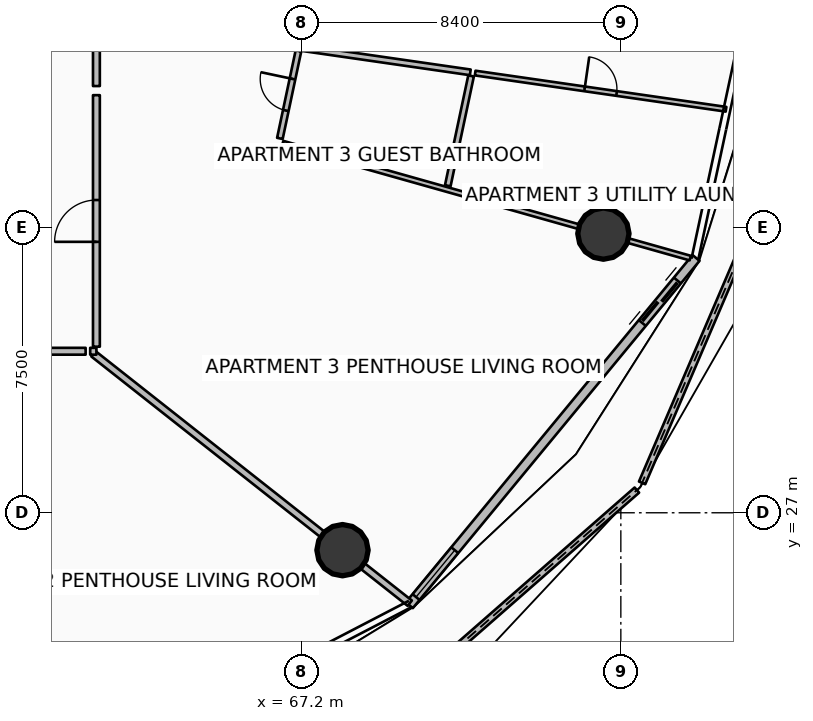
"""IFC4 building model, lengths in metres.
Left out: names, types, materials, properties, quantities, classifications, styles, units other than length and angle.
Written with IfcOpenShell. Run it as: python <this file> out.ifc"""

import sys

from ifc_helpers import new_model, si_unit, direction, frame, frame_2d, origin, origin_2d, place, context, subcontext, project, spatial, polyline, rectangle, circle, outline, extrude, element, fill, save


model = new_model("IFC4")
c1 = context("Model", 3, precision=1e-05, world=origin(), true_north=direction((0.0, 1.0)))
c2 = subcontext(c1, "Body", "Model", "MODEL_VIEW")
j1 = project(units=[si_unit("LENGTHUNIT", "METRE"), si_unit("PLANEANGLEUNIT", "RADIAN")], contexts=[c1])
p1 = place(None, origin())
s1 = spatial("IfcSite", under=j1, at=p1, CompositionType="ELEMENT")
p2 = place(p1, origin())
s2 = spatial("IfcBuilding", under=s1, at=p2, CompositionType="ELEMENT")
p3 = place(p2, frame((0.0, 0.0, 41.4)))
s3 = spatial("IfcBuildingStorey", under=s2, at=p3, CompositionType="ELEMENT", Elevation=41.4)
for number, where, z_axis, x_axis in (
    (1, (68.276, 26.016, 0.0), (0.0, 0.0, 1.0), (1.0, 0.0, 0.0)),
    (2, (75.141, 34.345, 0.0), (0.0, 0.0, 1.0), (1.0, 0.0, 0.0)),
):
    element("IfcColumn", number, at=place(p3, frame(where, z_axis=z_axis, x_axis=x_axis)), inside=s3, PredefinedType="COLUMN", context=c2, shape_type="SweptSolid", body=[
        extrude(circle(Radius=0.675, at=origin_2d()), origin(), (0.0, 0.0, 1.0), 3.5),
    ])
p4 = place(p3, frame((67.163, 19.839, 0.0), z_axis=(0.0, 0.0, 1.0), x_axis=(0.752310783683, 0.658808382426, 0.0)))
e3 = element("IfcWall", 3, at=p4, inside=s3, PredefinedType="PARAPET", context=c2, shape_type="SweptSolid", body=[
    extrude(outline(polyline([(0.0, 0.0), (11.776, 0.0), (11.776, 1.348), (5.888, 1.562), (0.0, 1.747), (0.0, 0.0)])), frame((0.0, 0.09, 0.0), z_axis=(0.0, -1.0, 0.0), x_axis=(1.0, 0.0, 0.0)), (0.0, 0.0, 1.0), 0.18),
])
p5 = place(p3, frame((76.159, 27.786, 0.0), z_axis=(0.0, 0.0, 1.0), x_axis=(0.393762615554, 0.919212164079, 0.0)))
e4 = element("IfcWall", 4, at=p5, inside=s3, PredefinedType="PARAPET", context=c2, shape_type="SweptSolid", body=[
    extrude(outline(polyline([(0.0, 0.0), (12.412, 0.0), (12.412, 1.12), (6.206, 1.182), (0.0, 1.348), (0.0, 0.0)])), frame((0.0, 0.09, 0.0), z_axis=(0.0, -1.0, 0.0), x_axis=(1.0, 0.0, 0.0)), (0.0, 0.0, 1.0), 0.18),
])
p6 = place(p3, frame((70.033, 24.567, 0.0), z_axis=(0.0, 0.0, 1.0), x_axis=(0.636674332663, 0.771132799281, 0.0)))
e5 = element("IfcWall", 5, at=p6, inside=s3, PredefinedType="SOLIDWALL", context=c2, shape_type="SweptSolid", body=[
    extrude(rectangle(XDim=11.851, YDim=0.24, at=frame_2d((5.926, 0.0))), origin(), (0.0, 0.0, 1.0), 2.45),
])
p7 = place(p6, frame((9.631, 0.0, 0.0)))
e6 = element("IfcOpeningElement", 6, at=p7, cuts=e5, PredefinedType="OPENING", context=c2, shape_type="SweptSolid", body=[
    extrude(rectangle(XDim=1.45, YDim=2.15, at=frame_2d((0.725, 1.075))), frame((0.0, 0.13, 0.0), z_axis=(0.0, -1.0, 0.0), x_axis=(1.0, 0.0, 0.0)), (0.0, 0.0, 1.0), 0.26),
])
p8 = place(p6, frame((0.28, 0.0, 0.65)))
e7 = element("IfcOpeningElement", 7, at=p8, cuts=e5, PredefinedType="OPENING", context=c2, shape_type="SweptSolid", body=[
    extrude(rectangle(XDim=1.6, YDim=1.5, at=frame_2d((0.8, 0.75))), frame((0.0, 0.13, 0.0), z_axis=(0.0, -1.0, 0.0), x_axis=(1.0, 0.0, 0.0)), (0.0, 0.0, 1.0), 0.26),
])
p9 = place(p3, frame((61.723, 31.182, 0.0), z_axis=(0.0, 0.0, 1.0), x_axis=(0.785321288316, -0.619088421889, 0.0)))
e8 = element("IfcWall", 8, at=p9, inside=s3, PredefinedType="PARTITIONING", context=c2, shape_type="SweptSolid", body=[
    extrude(rectangle(XDim=10.598, YDim=0.18, at=frame_2d((5.299, 0.0))), origin(), (0.0, 0.0, 1.0), 2.867),
])
p10 = place(p3, frame((54.14, 31.25, 0.0), z_axis=(0.0, 0.0, 1.0), x_axis=(1.0, 0.0, 0.0)))
e9 = element("IfcWall", 9, at=p10, inside=s3, PredefinedType="PARTITIONING", context=c2, shape_type="SweptSolid", body=[
    extrude(rectangle(XDim=7.376, YDim=0.18, at=frame_2d((3.688, 0.0))), origin(), (0.0, 0.0, 1.0), 2.867),
])
p11 = place(p10, frame((3.138, 0.0, 0.0)))
e10 = element("IfcOpeningElement", 10, at=p11, cuts=e9, PredefinedType="OPENING", context=c2, shape_type="SweptSolid", body=[
    extrude(rectangle(XDim=1.1, YDim=2.1, at=frame_2d((0.55, 1.05))), frame((0.0, 0.1, 0.0), z_axis=(0.0, -1.0, 0.0), x_axis=(1.0, 0.0, 0.0)), (0.0, 0.0, 1.0), 0.2),
])
p12 = place(p3, frame((61.636, 31.25, 0.0), z_axis=(0.0, 0.0, 1.0), x_axis=(1.0, 0.0, 0.0)))
e11 = element("IfcWall", 11, at=p12, inside=s3, PredefinedType="PARTITIONING", context=c2, shape_type="SweptSolid", body=[
    extrude(rectangle(XDim=0.164, YDim=0.18, at=frame_2d((0.082, 0.0))), origin(), (0.0, 0.0, 1.0), 2.867),
])
p13 = place(p3, frame((61.8, 31.37, 0.0), z_axis=(0.0, 0.0, 1.0), x_axis=(0.0, 1.0, 0.0)))
e12 = element("IfcWall", 12, at=p13, inside=s3, PredefinedType="PARTITIONING", context=c2, shape_type="SweptSolid", body=[
    extrude(rectangle(XDim=6.618, YDim=0.18, at=frame_2d((3.309, 0.0))), origin(), (0.0, 0.0, 1.0), 2.867),
])
p14 = place(p13, frame((2.759, 0.0, 0.0)))
e13 = element("IfcOpeningElement", 13, at=p14, cuts=e12, PredefinedType="OPENING", context=c2, shape_type="SweptSolid", body=[
    extrude(rectangle(XDim=1.1, YDim=2.1, at=frame_2d((0.55, 1.05))), frame((0.0, 0.1, 0.0), z_axis=(0.0, -1.0, 0.0), x_axis=(1.0, 0.0, 0.0)), (0.0, 0.0, 1.0), 0.2),
])
p15 = place(p3, frame((61.8, 38.228, 0.0), z_axis=(0.0, 0.0, 1.0), x_axis=(0.0, 1.0, 0.0)))
e14 = element("IfcWall", 14, at=p15, inside=s3, PredefinedType="PARTITIONING", context=c2, shape_type="SweptSolid", body=[
    extrude(rectangle(XDim=5.285, YDim=0.18, at=frame_2d((2.643, 0.0))), origin(), (0.0, 0.0, 1.0), 2.867),
])
p16 = place(p3, frame((66.703, 36.725, 0.0), z_axis=(0.0, 0.0, 1.0), x_axis=(0.962456868727, -0.271434662195, 0.0)))
e15 = element("IfcWall", 15, at=p16, inside=s3, PredefinedType="PARTITIONING", context=c2, shape_type="SweptSolid", body=[
    extrude(rectangle(XDim=11.141, YDim=0.125, at=frame_2d((5.571, 0.0))), origin(), (0.0, 0.0, 1.0), 2.867),
])
p17 = place(p3, frame((66.628, 36.85, 0.0), z_axis=(0.0, 0.0, 1.0), x_axis=(0.207543347309, 0.978225822082, 0.0)))
e16 = element("IfcWall", 16, at=p17, inside=s3, PredefinedType="PARTITIONING", context=c2, shape_type="SweptSolid", body=[
    extrude(rectangle(XDim=2.352, YDim=0.15, at=frame_2d((1.176, 0.0))), origin(), (0.0, 0.0, 1.0), 2.867),
])
p18 = place(p17, frame((0.751, 0.0, 0.0)))
e17 = element("IfcOpeningElement", 17, at=p18, cuts=e16, PredefinedType="OPENING", context=c2, shape_type="SweptSolid", body=[
    extrude(rectangle(XDim=0.85, YDim=2.06, at=frame_2d((0.425, 1.03))), frame((0.0, 0.085, 0.0), z_axis=(0.0, -1.0, 0.0), x_axis=(1.0, 0.0, 0.0)), (0.0, 0.0, 1.0), 0.17),
])
p19 = place(p3, frame((71.046, 35.604, 0.0), z_axis=(0.0, 0.0, 1.0), x_axis=(0.207542541756, 0.97822599299, 0.0)))
e18 = element("IfcWall", 18, at=p19, inside=s3, PredefinedType="PARTITIONING", context=c2, shape_type="SweptSolid", body=[
    extrude(rectangle(XDim=2.955, YDim=0.15, at=frame_2d((1.478, 0.0))), origin(), (0.0, 0.0, 1.0), 2.867),
])
p20 = place(p3, frame((67.224, 39.226, 0.0), z_axis=(0.0, 0.0, 1.0), x_axis=(0.989741519473, -0.142869607092, 0.0)))
e19 = element("IfcWall", 19, at=p20, inside=s3, PredefinedType="PARTITIONING", context=c2, shape_type="SweptSolid", body=[
    extrude(rectangle(XDim=4.46, YDim=0.15, at=frame_2d((2.23, 0.0))), origin(), (0.0, 0.0, 1.0), 2.94),
])
p21 = place(p3, frame((71.767, 38.57, 0.0), z_axis=(0.0, 0.0, 1.0), x_axis=(0.989747166196, -0.142830483468, 0.0)))
e20 = element("IfcWall", 20, at=p21, inside=s3, PredefinedType="PARTITIONING", context=c2, shape_type="SweptSolid", body=[
    extrude(rectangle(XDim=6.67, YDim=0.125, at=frame_2d((3.335, 0.0))), origin(), (0.0, 0.0, 1.0), 2.94),
])
p22 = place(p21, frame((2.91, 0.0, 0.0)))
e21 = element("IfcOpeningElement", 21, at=p22, cuts=e20, PredefinedType="OPENING", context=c2, shape_type="SweptSolid", body=[
    extrude(rectangle(XDim=0.85, YDim=2.06, at=frame_2d((0.425, 1.03))), frame((0.0, 0.073, 0.0), z_axis=(0.0, -1.0, 0.0), x_axis=(1.0, 0.0, 0.0)), (0.0, 0.0, 1.0), 0.145),
])
p23 = place(p7, origin())
e22 = element("IfcDoor", 22, at=p23, inside=s3, OperationType="DOUBLE_DOOR_SLIDING", PredefinedType="DOOR", context=c2, shape_type="SweptSolid", body=[
    extrude(rectangle(XDim=1.45, YDim=2.15, at=frame_2d((0.725, 1.075))), frame((0.0, 0.025, 0.0), z_axis=(0.0, -1.0, 0.0), x_axis=(1.0, 0.0, 0.0)), (0.0, 0.0, 1.0), 0.05),
])
fill(e6, e22)
p24 = place(p8, origin())
e23 = element("IfcWindow", 23, at=p24, inside=s3, PartitioningType="SINGLE_PANEL", PredefinedType="WINDOW", context=c2, shape_type="SweptSolid", body=[
    extrude(rectangle(XDim=1.6, YDim=1.5, at=frame_2d((0.8, 0.75))), frame((0.0, 0.03, 0.0), z_axis=(0.0, -1.0, 0.0), x_axis=(1.0, 0.0, 0.0)), (0.0, 0.0, 1.0), 0.06),
])
fill(e7, e23)
p25 = place(p14, origin())
e24 = element("IfcDoor", 24, at=p25, inside=s3, OperationType="SINGLE_SWING_LEFT", PredefinedType="DOOR", context=c2, shape_type="SweptSolid", body=[
    extrude(rectangle(XDim=1.1, YDim=2.1, at=frame_2d((0.55, 1.05))), frame((0.0, 0.025, 0.0), z_axis=(0.0, -1.0, 0.0), x_axis=(1.0, 0.0, 0.0)), (0.0, 0.0, 1.0), 0.05),
])
fill(e13, e24)
p26 = place(p18, origin())
e25 = element("IfcDoor", 25, at=p26, inside=s3, OperationType="SINGLE_SWING_RIGHT", PredefinedType="DOOR", context=c2, shape_type="SweptSolid", body=[
    extrude(rectangle(XDim=0.85, YDim=2.06, at=frame_2d((0.425, 1.03))), frame((0.0, 0.025, 0.0), z_axis=(0.0, -1.0, 0.0), x_axis=(1.0, 0.0, 0.0)), (0.0, 0.0, 1.0), 0.05),
])
fill(e17, e25)
p27 = place(p22, origin())
e26 = element("IfcDoor", 26, at=p27, inside=s3, OperationType="SINGLE_SWING_LEFT", PredefinedType="DOOR", context=c2, shape_type="SweptSolid", body=[
    extrude(rectangle(XDim=0.85, YDim=2.06, at=frame_2d((0.425, 1.03))), frame((0.0, 0.025, 0.0), z_axis=(0.0, -1.0, 0.0), x_axis=(1.0, 0.0, 0.0)), (0.0, 0.0, 1.0), 0.05),
])
fill(e21, e26)
save(model, sys.argv[1])
